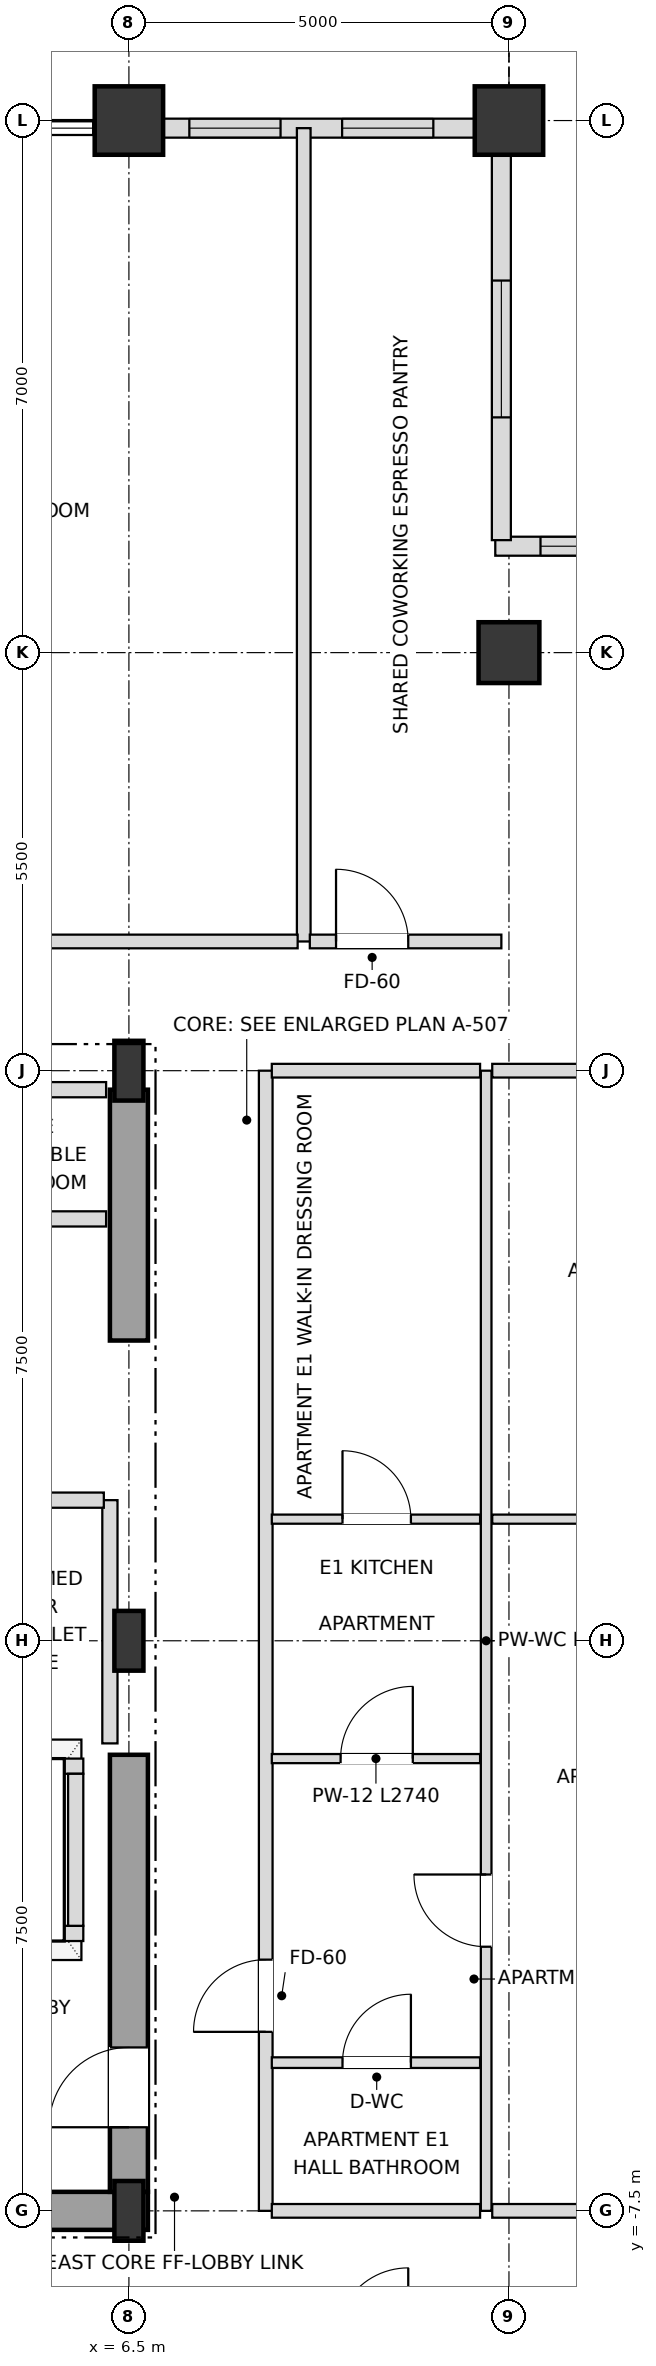
"""IFC4 building model, lengths in metres.
Left out: names, types, materials, properties, quantities, classifications, styles, units other than length and angle.
Written with IfcOpenShell. Run it as: python <this file> out.ifc"""

import sys

from ifc_helpers import new_model, si_unit, direction, frame, frame_2d, origin, origin_2d, place, context, subcontext, project, spatial, rectangle, i_section, extrude, element, fill, save


model = new_model("IFC4")
c1 = context("Model", 3, precision=1e-05, world=origin(), true_north=direction((0.0, 1.0)))
c2 = subcontext(c1, "Body", "Model", "MODEL_VIEW")
j1 = project(units=[si_unit("LENGTHUNIT", "METRE"), si_unit("PLANEANGLEUNIT", "RADIAN")], contexts=[c1])
p1 = place(None, origin())
s1 = spatial("IfcSite", under=j1, at=p1, CompositionType="ELEMENT")
p2 = place(p1, origin())
s2 = spatial("IfcBuilding", under=s1, at=p2, CompositionType="ELEMENT")
p3 = place(p2, frame((0.0, 0.0, 294.3)))
s3 = spatial("IfcBuildingStorey", under=s2, at=p3, CompositionType="ELEMENT", Elevation=294.3)
for number, where, z_axis, x_axis in (
    (1, (6.5, -7.5, 0.0), (0.0, 0.0, 1.0), (1.0, 0.0, 0.0)),
    (2, (6.5, 0.0, 0.0), (0.0, 0.0, 1.0), (1.0, 0.0, 0.0)),
    (3, (6.5, 7.5, 0.0), (0.0, 0.0, 1.0), (1.0, 0.0, 0.0)),
):
    element("IfcColumn", number, at=place(p3, frame(where, z_axis=z_axis, x_axis=x_axis)), inside=s3, PredefinedType="COLUMN", context=c2, shape_type="SweptSolid", body=[
        extrude(i_section(OverallWidth=0.382, OverallDepth=0.786, WebThickness=0.02, FlangeThickness=0.033, at=origin_2d()), origin(), (0.0, 0.0, 1.0), 3.6),
    ])
for number, where, z_axis, x_axis in (
    (4, (11.5, 20.0, 0.0), (0.0, 0.0, 1.0), (1.0, 0.0, 0.0)),
    (5, (6.5, 20.0, 0.0), (0.0, 0.0, 1.0), (1.0, 0.0, 0.0)),
):
    element("IfcColumn", number, at=place(p3, frame(where, z_axis=z_axis, x_axis=x_axis)), inside=s3, PredefinedType="USERDEFINED", context=c2, shape_type="SweptSolid", body=[
        extrude(rectangle(XDim=0.9, YDim=0.9, at=origin_2d()), origin(), (0.0, 0.0, 1.0), 3.6),
    ])
p4 = place(p3, frame((11.5, 13.0, 0.0), z_axis=(0.0, 0.0, 1.0), x_axis=(1.0, 0.0, 0.0)))
e6 = element("IfcColumn", 6, at=p4, inside=s3, PredefinedType="COLUMN", context=c2, shape_type="SweptSolid", body=[
    extrude(rectangle(XDim=0.8, YDim=0.8, at=origin_2d()), origin(), (0.0, 0.0, 1.0), 3.6),
])
p5 = place(p3, frame((11.055, 19.9, 0.0), z_axis=(0.0, 0.0, 1.0), x_axis=(-1.0, 0.0, 0.0)))
e7 = element("IfcWall", 7, at=p5, inside=s3, PredefinedType="SOLIDWALL", context=c2, shape_type="SweptSolid", body=[
    extrude(rectangle(XDim=4.11, YDim=0.25, at=frame_2d((2.055, 0.0))), origin(), (0.0, 0.0, 1.0), 2.748),
])
p6 = place(p5, frame((0.55, 0.0, 0.72)))
e8 = element("IfcOpeningElement", 8, at=p6, cuts=e7, PredefinedType="OPENING", context=c2, shape_type="SweptSolid", body=[
    extrude(rectangle(XDim=1.2, YDim=1.68, at=frame_2d((0.6, 0.84))), frame((0.0, 0.135, 0.0), z_axis=(0.0, -1.0, 0.0), x_axis=(1.0, 0.0, 0.0)), (0.0, 0.0, 1.0), 0.27),
])
p7 = place(p5, frame((2.56, 0.0, 0.72)))
e9 = element("IfcOpeningElement", 9, at=p7, cuts=e7, PredefinedType="OPENING", context=c2, shape_type="SweptSolid", body=[
    extrude(rectangle(XDim=1.2, YDim=1.68, at=frame_2d((0.6, 0.84))), frame((0.0, 0.135, 0.0), z_axis=(0.0, -1.0, 0.0), x_axis=(1.0, 0.0, 0.0)), (0.0, 0.0, 1.0), 0.27),
])
p8 = place(p3, frame((16.98, 14.4, 0.0), z_axis=(0.0, 0.0, 1.0), x_axis=(-1.0, 0.0, 0.0)))
e10 = element("IfcWall", 10, at=p8, inside=s3, PredefinedType="SOLIDWALL", context=c2, shape_type="SweptSolid", body=[
    extrude(rectangle(XDim=5.66, YDim=0.25, at=frame_2d((2.83, 0.0))), origin(), (0.0, 0.0, 1.0), 2.748),
])
p9 = place(p8, frame((0.595, 0.0, 0.72)))
e11 = element("IfcOpeningElement", 11, at=p9, cuts=e10, PredefinedType="OPENING", context=c2, shape_type="SweptSolid", body=[
    extrude(rectangle(XDim=1.8, YDim=1.68, at=frame_2d((0.9, 0.84))), frame((0.0, 0.135, 0.0), z_axis=(0.0, -1.0, 0.0), x_axis=(1.0, 0.0, 0.0)), (0.0, 0.0, 1.0), 0.27),
])
p10 = place(p8, frame((3.265, 0.0, 0.72)))
e12 = element("IfcOpeningElement", 12, at=p10, cuts=e10, PredefinedType="OPENING", context=c2, shape_type="SweptSolid", body=[
    extrude(rectangle(XDim=1.8, YDim=1.68, at=frame_2d((0.9, 0.84))), frame((0.0, 0.135, 0.0), z_axis=(0.0, -1.0, 0.0), x_axis=(1.0, 0.0, 0.0)), (0.0, 0.0, 1.0), 0.27),
])
p11 = place(p3, frame((11.4, 14.48, 0.0), z_axis=(0.0, 0.0, 1.0), x_axis=(0.0, 1.0, 0.0)))
e13 = element("IfcWall", 13, at=p11, inside=s3, PredefinedType="SOLIDWALL", context=c2, shape_type="SweptSolid", body=[
    extrude(rectangle(XDim=5.34, YDim=0.25, at=frame_2d((2.67, 0.0))), origin(), (0.0, 0.0, 1.0), 2.748),
])
p12 = place(p11, frame((1.615, 0.0, 0.72)))
e14 = element("IfcOpeningElement", 14, at=p12, cuts=e13, PredefinedType="OPENING", context=c2, shape_type="SweptSolid", body=[
    extrude(rectangle(XDim=1.8, YDim=1.68, at=frame_2d((0.9, 0.84))), frame((0.0, 0.135, 0.0), z_axis=(0.0, -1.0, 0.0), x_axis=(1.0, 0.0, 0.0)), (0.0, 0.0, 1.0), 0.27),
])
p13 = place(p3, frame((0.0, -7.5, 0.0), z_axis=(0.0, 0.0, 1.0), x_axis=(1.0, 0.0, 0.0)))
e15 = element("IfcWall", 15, at=p13, inside=s3, PredefinedType="SHEAR", context=c2, shape_type="SweptSolid", body=[
    extrude(rectangle(XDim=6.75, YDim=0.5, at=frame_2d((3.375, 0.0))), origin(), (0.0, 0.0, 1.0), 3.38),
])
p14 = place(p3, frame((6.5, -7.25, 0.0), z_axis=(0.0, 0.0, 1.0), x_axis=(0.0, 1.0, 0.0)))
e16 = element("IfcWall", 16, at=p14, inside=s3, PredefinedType="SHEAR", context=c2, shape_type="SweptSolid", body=[
    extrude(rectangle(XDim=5.75, YDim=0.5, at=frame_2d((2.875, 0.0))), origin(), (0.0, 0.0, 1.0), 3.38),
])
p15 = place(p14, frame((0.85, 0.0, 0.0)))
e17 = element("IfcOpeningElement", 17, at=p15, cuts=e16, PredefinedType="OPENING", context=c2, shape_type="SweptSolid", body=[
    extrude(rectangle(XDim=1.05, YDim=2.15, at=frame_2d((0.525, 1.075))), frame((0.0, 0.26, 0.0), z_axis=(0.0, -1.0, 0.0), x_axis=(1.0, 0.0, 0.0)), (0.0, 0.0, 1.0), 0.52),
])
p16 = place(p3, frame((6.5, 3.95, 0.0), z_axis=(0.0, 0.0, 1.0), x_axis=(0.0, 1.0, 0.0)))
e18 = element("IfcWall", 18, at=p16, inside=s3, PredefinedType="SHEAR", context=c2, shape_type="SweptSolid", body=[
    extrude(rectangle(XDim=3.3, YDim=0.5, at=frame_2d((1.65, 0.0))), origin(), (0.0, 0.0, 1.0), 3.38),
])
p17 = place(p3, frame((1.8, -3.85, 0.0), z_axis=(0.0, 0.0, 1.0), x_axis=(1.0, 0.0, 0.0)))
e19 = element("IfcWall", 19, at=p17, inside=s3, PredefinedType="SOLIDWALL", context=c2, shape_type="SweptSolid", body=[
    extrude(rectangle(XDim=4.1, YDim=0.2, at=frame_2d((2.05, 0.0))), origin(), (0.0, 0.0, 1.0), 3.38),
])
p18 = place(p17, frame((0.45, 0.0, 0.0)))
e20 = element("IfcOpeningElement", 20, at=p18, cuts=e19, PredefinedType="OPENING", context=c2, shape_type="SweptSolid", body=[
    extrude(rectangle(XDim=1.2, YDim=2.2, at=frame_2d((0.6, 1.1))), frame((0.0, 0.11, 0.0), z_axis=(0.0, -1.0, 0.0), x_axis=(1.0, 0.0, 0.0)), (0.0, 0.0, 1.0), 0.22),
])
p19 = place(p17, frame((2.45, 0.0, 0.0)))
e21 = element("IfcOpeningElement", 21, at=p19, cuts=e19, PredefinedType="OPENING", context=c2, shape_type="SweptSolid", body=[
    extrude(rectangle(XDim=1.2, YDim=2.2, at=frame_2d((0.6, 1.1))), frame((0.0, 0.11, 0.0), z_axis=(0.0, -1.0, 0.0), x_axis=(1.0, 0.0, 0.0)), (0.0, 0.0, 1.0), 0.22),
])
p20 = place(p3, frame((1.8, -1.65, 0.0), z_axis=(0.0, 0.0, 1.0), x_axis=(1.0, 0.0, 0.0)))
e22 = element("IfcWall", 22, at=p20, inside=s3, PredefinedType="SOLIDWALL", context=c2, shape_type="SweptSolid", body=[
    extrude(rectangle(XDim=4.1, YDim=0.2, at=frame_2d((2.05, 0.0))), origin(), (0.0, 0.0, 1.0), 3.38),
])
p21 = place(p3, frame((5.8, -3.75, 0.0), z_axis=(0.0, 0.0, 1.0), x_axis=(0.0, 1.0, 0.0)))
e23 = element("IfcWall", 23, at=p21, inside=s3, PredefinedType="SOLIDWALL", context=c2, shape_type="SweptSolid", body=[
    extrude(rectangle(XDim=2.0, YDim=0.2, at=frame_2d((1.0, 0.0))), origin(), (0.0, 0.0, 1.0), 3.38),
])
p22 = place(p3, frame((6.25, -1.35, 0.0), z_axis=(0.0, 0.0, 1.0), x_axis=(0.0, 1.0, 0.0)))
e24 = element("IfcWall", 24, at=p22, inside=s3, PredefinedType="SOLIDWALL", context=c2, shape_type="SweptSolid", body=[
    extrude(rectangle(XDim=3.2, YDim=0.2, at=frame_2d((1.6, 0.0))), origin(), (0.0, 0.0, 1.0), 3.38),
])
p23 = place(p3, frame((8.3, -7.5, 0.0), z_axis=(0.0, 0.0, 1.0), x_axis=(0.0, 1.0, 0.0)))
e25 = element("IfcWall", 25, at=p23, inside=s3, PredefinedType="PARTITIONING", context=c2, shape_type="SweptSolid", body=[
    extrude(rectangle(XDim=15.0, YDim=0.18, at=frame_2d((7.5, 0.0))), origin(), (0.0, 0.0, 1.0), 3.38),
])
p24 = place(p23, frame((2.355, 0.0, 0.0)))
e26 = element("IfcOpeningElement", 26, at=p24, cuts=e25, PredefinedType="OPENING", context=c2, shape_type="SweptSolid", body=[
    extrude(rectangle(XDim=0.95, YDim=2.15, at=frame_2d((0.475, 1.075))), frame((0.0, 0.1, 0.0), z_axis=(0.0, -1.0, 0.0), x_axis=(1.0, 0.0, 0.0)), (0.0, 0.0, 1.0), 0.2),
])
p25 = place(p3, frame((8.8, 9.2, 0.0), z_axis=(0.0, 0.0, 1.0), x_axis=(0.0, 1.0, 0.0)))
e27 = element("IfcWall", 27, at=p25, inside=s3, PredefinedType="PARTITIONING", context=c2, shape_type="SweptSolid", body=[
    extrude(rectangle(XDim=10.7, YDim=0.18, at=frame_2d((5.35, 0.0))), origin(), (0.0, 0.0, 1.0), 2.826),
])
p26 = place(p3, frame((11.2, -7.5, 0.0), z_axis=(0.0, 0.0, 1.0), x_axis=(0.0, 1.0, 0.0)))
e28 = element("IfcWall", 28, at=p26, inside=s3, PredefinedType="PARTITIONING", context=c2, shape_type="SweptSolid", body=[
    extrude(rectangle(XDim=15.0, YDim=0.14, at=frame_2d((7.5, 0.0))), origin(), (0.0, 0.0, 1.0), 3.38),
])
p27 = place(p26, frame((3.475, 0.0, 0.0)))
e29 = element("IfcOpeningElement", 29, at=p27, cuts=e28, PredefinedType="OPENING", context=c2, shape_type="SweptSolid", body=[
    extrude(rectangle(XDim=0.95, YDim=2.1, at=frame_2d((0.475, 1.05))), frame((0.0, 0.08, 0.0), z_axis=(0.0, -1.0, 0.0), x_axis=(1.0, 0.0, 0.0)), (0.0, 0.0, 1.0), 0.16),
])
p28 = place(p3, frame((8.38, -7.5, 0.0), z_axis=(0.0, 0.0, 1.0), x_axis=(1.0, 0.0, 0.0)))
e30 = element("IfcWall", 30, at=p28, inside=s3, PredefinedType="PARTITIONING", context=c2, shape_type="SweptSolid", body=[
    extrude(rectangle(XDim=2.74, YDim=0.18, at=frame_2d((1.37, 0.0))), origin(), (0.0, 0.0, 1.0), 2.826),
])
p29 = place(p3, frame((11.28, -7.5, 0.0), z_axis=(0.0, 0.0, 1.0), x_axis=(1.0, 0.0, 0.0)))
e31 = element("IfcWall", 31, at=p29, inside=s3, PredefinedType="PARTITIONING", context=c2, shape_type="SweptSolid", body=[
    extrude(rectangle(XDim=5.62, YDim=0.18, at=frame_2d((2.81, 0.0))), origin(), (0.0, 0.0, 1.0), 2.826),
])
p30 = place(p3, frame((8.38, -5.55, 0.0), z_axis=(0.0, 0.0, 1.0), x_axis=(1.0, 0.0, 0.0)))
e32 = element("IfcWall", 32, at=p30, inside=s3, PredefinedType="PARTITIONING", context=c2, shape_type="SweptSolid", body=[
    extrude(rectangle(XDim=2.74, YDim=0.14, at=frame_2d((1.37, 0.0))), origin(), (0.0, 0.0, 1.0), 3.38),
])
p31 = place(p30, frame((0.93, 0.0, 0.0)))
e33 = element("IfcOpeningElement", 33, at=p31, cuts=e32, PredefinedType="OPENING", context=c2, shape_type="SweptSolid", body=[
    extrude(rectangle(XDim=0.9, YDim=2.1, at=frame_2d((0.45, 1.05))), frame((0.0, 0.08, 0.0), z_axis=(0.0, -1.0, 0.0), x_axis=(1.0, 0.0, 0.0)), (0.0, 0.0, 1.0), 0.16),
])
p32 = place(p3, frame((8.38, -1.55, 0.0), z_axis=(0.0, 0.0, 1.0), x_axis=(1.0, 0.0, 0.0)))
e34 = element("IfcWall", 34, at=p32, inside=s3, PredefinedType="PARTITIONING", context=c2, shape_type="SweptSolid", body=[
    extrude(rectangle(XDim=2.74, YDim=0.12, at=frame_2d((1.37, 0.0))), origin(), (0.0, 0.0, 1.0), 3.38),
])
p33 = place(p32, frame((0.905, 0.0, 0.0)))
e35 = element("IfcOpeningElement", 35, at=p33, cuts=e34, PredefinedType="OPENING", context=c2, shape_type="SweptSolid", body=[
    extrude(rectangle(XDim=0.95, YDim=2.1, at=frame_2d((0.475, 1.05))), frame((0.0, 0.07, 0.0), z_axis=(0.0, -1.0, 0.0), x_axis=(1.0, 0.0, 0.0)), (0.0, 0.0, 1.0), 0.14),
])
p34 = place(p3, frame((8.38, 1.6, 0.0), z_axis=(0.0, 0.0, 1.0), x_axis=(1.0, 0.0, 0.0)))
e36 = element("IfcWall", 36, at=p34, inside=s3, PredefinedType="PARTITIONING", context=c2, shape_type="SweptSolid", body=[
    extrude(rectangle(XDim=2.74, YDim=0.12, at=frame_2d((1.37, 0.0))), origin(), (0.0, 0.0, 1.0), 3.38),
])
p35 = place(p34, frame((0.93, 0.0, 0.0)))
e37 = element("IfcOpeningElement", 37, at=p35, cuts=e36, PredefinedType="OPENING", context=c2, shape_type="SweptSolid", body=[
    extrude(rectangle(XDim=0.9, YDim=2.1, at=frame_2d((0.45, 1.05))), frame((0.0, 0.07, 0.0), z_axis=(0.0, -1.0, 0.0), x_axis=(1.0, 0.0, 0.0)), (0.0, 0.0, 1.0), 0.14),
])
p36 = place(p3, frame((11.28, 1.6, 0.0), z_axis=(0.0, 0.0, 1.0), x_axis=(1.0, 0.0, 0.0)))
e38 = element("IfcWall", 38, at=p36, inside=s3, PredefinedType="PARTITIONING", context=c2, shape_type="SweptSolid", body=[
    extrude(rectangle(XDim=5.54, YDim=0.12, at=frame_2d((2.77, 0.0))), origin(), (0.0, 0.0, 1.0), 3.018),
])
p37 = place(p36, frame((2.33, 0.0, 0.0)))
e39 = element("IfcOpeningElement", 39, at=p37, cuts=e38, PredefinedType="OPENING", context=c2, shape_type="SweptSolid", body=[
    extrude(rectangle(XDim=0.9, YDim=2.1, at=frame_2d((0.45, 1.05))), frame((0.0, 0.07, 0.0), z_axis=(0.0, -1.0, 0.0), x_axis=(1.0, 0.0, 0.0)), (0.0, 0.0, 1.0), 0.14),
])
p38 = place(p3, frame((4.13, 1.85, 0.0), z_axis=(0.0, 0.0, 1.0), x_axis=(1.0, 0.0, 0.0)))
e40 = element("IfcWall", 40, at=p38, inside=s3, PredefinedType="SOLIDWALL", context=c2, shape_type="SweptSolid", body=[
    extrude(rectangle(XDim=2.04, YDim=0.2, at=frame_2d((1.02, 0.0))), origin(), (0.0, 0.0, 1.0), 3.38),
])
for number, where, z_axis, x_axis in (
    (41, (4.13, 5.55, 0.0), (0.0, 0.0, 1.0), (1.0, 0.0, 0.0)),
    (42, (4.13, 7.25, 0.0), (0.0, 0.0, 1.0), (1.0, 0.0, 0.0)),
):
    element("IfcWall", number, at=place(p3, frame(where, z_axis=z_axis, x_axis=x_axis)), inside=s3, PredefinedType="SOLIDWALL", context=c2, shape_type="SweptSolid", body=[
        extrude(rectangle(XDim=2.07, YDim=0.2, at=frame_2d((1.035, 0.0))), origin(), (0.0, 0.0, 1.0), 3.38),
    ])
p39 = place(p3, frame((8.38, 7.5, 0.0), z_axis=(0.0, 0.0, 1.0), x_axis=(1.0, 0.0, 0.0)))
e43 = element("IfcWall", 43, at=p39, inside=s3, PredefinedType="PARTITIONING", context=c2, shape_type="SweptSolid", body=[
    extrude(rectangle(XDim=2.74, YDim=0.18, at=frame_2d((1.37, 0.0))), origin(), (0.0, 0.0, 1.0), 2.826),
])
p40 = place(p3, frame((11.28, 7.5, 0.0), z_axis=(0.0, 0.0, 1.0), x_axis=(1.0, 0.0, 0.0)))
e44 = element("IfcWall", 44, at=p40, inside=s3, PredefinedType="PARTITIONING", context=c2, shape_type="SweptSolid", body=[
    extrude(rectangle(XDim=5.62, YDim=0.18, at=frame_2d((2.81, 0.0))), origin(), (0.0, 0.0, 1.0), 2.826),
])
p41 = place(p3, frame((-1.07, 9.2, 0.0), z_axis=(0.0, 0.0, 1.0), x_axis=(1.0, 0.0, 0.0)))
e45 = element("IfcWall", 45, at=p41, inside=s3, PredefinedType="PARTITIONING", context=c2, shape_type="SweptSolid", body=[
    extrude(rectangle(XDim=9.79, YDim=0.18, at=frame_2d((4.895, 0.0))), origin(), (0.0, 0.0, 1.0), 2.826),
])
p42 = place(p41, frame((4.435, 0.0, 0.0)))
e46 = element("IfcOpeningElement", 46, at=p42, cuts=e45, PredefinedType="OPENING", context=c2, shape_type="SweptSolid", body=[
    extrude(rectangle(XDim=0.95, YDim=2.15, at=frame_2d((0.475, 1.075))), frame((0.0, 0.1, 0.0), z_axis=(0.0, -1.0, 0.0), x_axis=(1.0, 0.0, 0.0)), (0.0, 0.0, 1.0), 0.2),
])
p43 = place(p3, frame((8.88, 9.2, 0.0), z_axis=(0.0, 0.0, 1.0), x_axis=(1.0, 0.0, 0.0)))
e47 = element("IfcWall", 47, at=p43, inside=s3, PredefinedType="PARTITIONING", context=c2, shape_type="SweptSolid", body=[
    extrude(rectangle(XDim=2.52, YDim=0.18, at=frame_2d((1.26, 0.0))), origin(), (0.0, 0.0, 1.0), 3.38),
])
p44 = place(p43, frame((0.345, 0.0, 0.0)))
e48 = element("IfcOpeningElement", 48, at=p44, cuts=e47, PredefinedType="OPENING", context=c2, shape_type="SweptSolid", body=[
    extrude(rectangle(XDim=0.95, YDim=2.15, at=frame_2d((0.475, 1.075))), frame((0.0, 0.1, 0.0), z_axis=(0.0, -1.0, 0.0), x_axis=(1.0, 0.0, 0.0)), (0.0, 0.0, 1.0), 0.2),
])
p45 = place(p6, origin())
e49 = element("IfcWindow", 49, at=p45, inside=s3, PartitioningType="SINGLE_PANEL", PredefinedType="WINDOW", context=c2, shape_type="SweptSolid", body=[
    extrude(rectangle(XDim=1.2, YDim=1.68, at=frame_2d((0.6, 0.84))), frame((0.0, 0.03, 0.0), z_axis=(0.0, -1.0, 0.0), x_axis=(1.0, 0.0, 0.0)), (0.0, 0.0, 1.0), 0.06),
])
fill(e8, e49)
p46 = place(p7, origin())
e50 = element("IfcWindow", 50, at=p46, inside=s3, PartitioningType="SINGLE_PANEL", PredefinedType="WINDOW", context=c2, shape_type="SweptSolid", body=[
    extrude(rectangle(XDim=1.2, YDim=1.68, at=frame_2d((0.6, 0.84))), frame((0.0, 0.03, 0.0), z_axis=(0.0, -1.0, 0.0), x_axis=(1.0, 0.0, 0.0)), (0.0, 0.0, 1.0), 0.06),
])
fill(e9, e50)
p47 = place(p10, origin())
e51 = element("IfcWindow", 51, at=p47, inside=s3, PartitioningType="SINGLE_PANEL", PredefinedType="WINDOW", context=c2, shape_type="SweptSolid", body=[
    extrude(rectangle(XDim=1.8, YDim=1.68, at=frame_2d((0.9, 0.84))), frame((0.0, 0.03, 0.0), z_axis=(0.0, -1.0, 0.0), x_axis=(1.0, 0.0, 0.0)), (0.0, 0.0, 1.0), 0.06),
])
fill(e12, e51)
p48 = place(p12, origin())
e52 = element("IfcWindow", 52, at=p48, inside=s3, PartitioningType="SINGLE_PANEL", PredefinedType="WINDOW", context=c2, shape_type="SweptSolid", body=[
    extrude(rectangle(XDim=1.8, YDim=1.68, at=frame_2d((0.9, 0.84))), frame((0.0, 0.03, 0.0), z_axis=(0.0, -1.0, 0.0), x_axis=(1.0, 0.0, 0.0)), (0.0, 0.0, 1.0), 0.06),
])
fill(e14, e52)
p49 = place(p15, origin())
e53 = element("IfcDoor", 53, at=p49, inside=s3, OperationType="SINGLE_SWING_LEFT", PredefinedType="DOOR", context=c2, shape_type="SweptSolid", body=[
    extrude(rectangle(XDim=1.05, YDim=2.15, at=frame_2d((0.525, 1.075))), frame((0.0, 0.025, 0.0), z_axis=(0.0, -1.0, 0.0), x_axis=(1.0, 0.0, 0.0)), (0.0, 0.0, 1.0), 0.05),
])
fill(e17, e53)
p50 = place(p44, origin())
e54 = element("IfcDoor", 54, at=p50, inside=s3, OperationType="SINGLE_SWING_LEFT", PredefinedType="DOOR", context=c2, shape_type="SweptSolid", body=[
    extrude(rectangle(XDim=0.95, YDim=2.15, at=frame_2d((0.475, 1.075))), frame((0.0, 0.025, 0.0), z_axis=(0.0, -1.0, 0.0), x_axis=(1.0, 0.0, 0.0)), (0.0, 0.0, 1.0), 0.05),
])
fill(e48, e54)
p51 = place(p31, origin())
e55 = element("IfcDoor", 55, at=p51, inside=s3, OperationType="SINGLE_SWING_RIGHT", PredefinedType="DOOR", context=c2, shape_type="SweptSolid", body=[
    extrude(rectangle(XDim=0.9, YDim=2.1, at=frame_2d((0.45, 1.05))), frame((0.0, 0.025, 0.0), z_axis=(0.0, -1.0, 0.0), x_axis=(1.0, 0.0, 0.0)), (0.0, 0.0, 1.0), 0.05),
])
fill(e33, e55)
p52 = place(p24, origin())
e56 = element("IfcDoor", 56, at=p52, inside=s3, OperationType="SINGLE_SWING_LEFT", PredefinedType="DOOR", context=c2, shape_type="SweptSolid", body=[
    extrude(rectangle(XDim=0.95, YDim=2.15, at=frame_2d((0.475, 1.075))), frame((0.0, 0.025, 0.0), z_axis=(0.0, -1.0, 0.0), x_axis=(1.0, 0.0, 0.0)), (0.0, 0.0, 1.0), 0.05),
])
fill(e26, e56)
p53 = place(p33, origin())
e57 = element("IfcDoor", 57, at=p53, inside=s3, OperationType="SINGLE_SWING_RIGHT", PredefinedType="DOOR", context=c2, shape_type="SweptSolid", body=[
    extrude(rectangle(XDim=0.95, YDim=2.1, at=frame_2d((0.475, 1.05))), frame((0.0, 0.025, 0.0), z_axis=(0.0, -1.0, 0.0), x_axis=(1.0, 0.0, 0.0)), (0.0, 0.0, 1.0), 0.05),
])
fill(e35, e57)
p54 = place(p35, origin())
e58 = element("IfcDoor", 58, at=p54, inside=s3, OperationType="SINGLE_SWING_LEFT", PredefinedType="DOOR", context=c2, shape_type="SweptSolid", body=[
    extrude(rectangle(XDim=0.9, YDim=2.1, at=frame_2d((0.45, 1.05))), frame((0.0, 0.025, 0.0), z_axis=(0.0, -1.0, 0.0), x_axis=(1.0, 0.0, 0.0)), (0.0, 0.0, 1.0), 0.05),
])
fill(e37, e58)
p55 = place(p27, origin())
e59 = element("IfcDoor", 59, at=p55, inside=s3, OperationType="SINGLE_SWING_RIGHT", PredefinedType="DOOR", context=c2, shape_type="SweptSolid", body=[
    extrude(rectangle(XDim=0.95, YDim=2.1, at=frame_2d((0.475, 1.05))), frame((0.0, 0.025, 0.0), z_axis=(0.0, -1.0, 0.0), x_axis=(1.0, 0.0, 0.0)), (0.0, 0.0, 1.0), 0.05),
])
fill(e29, e59)
save(model, sys.argv[1])
